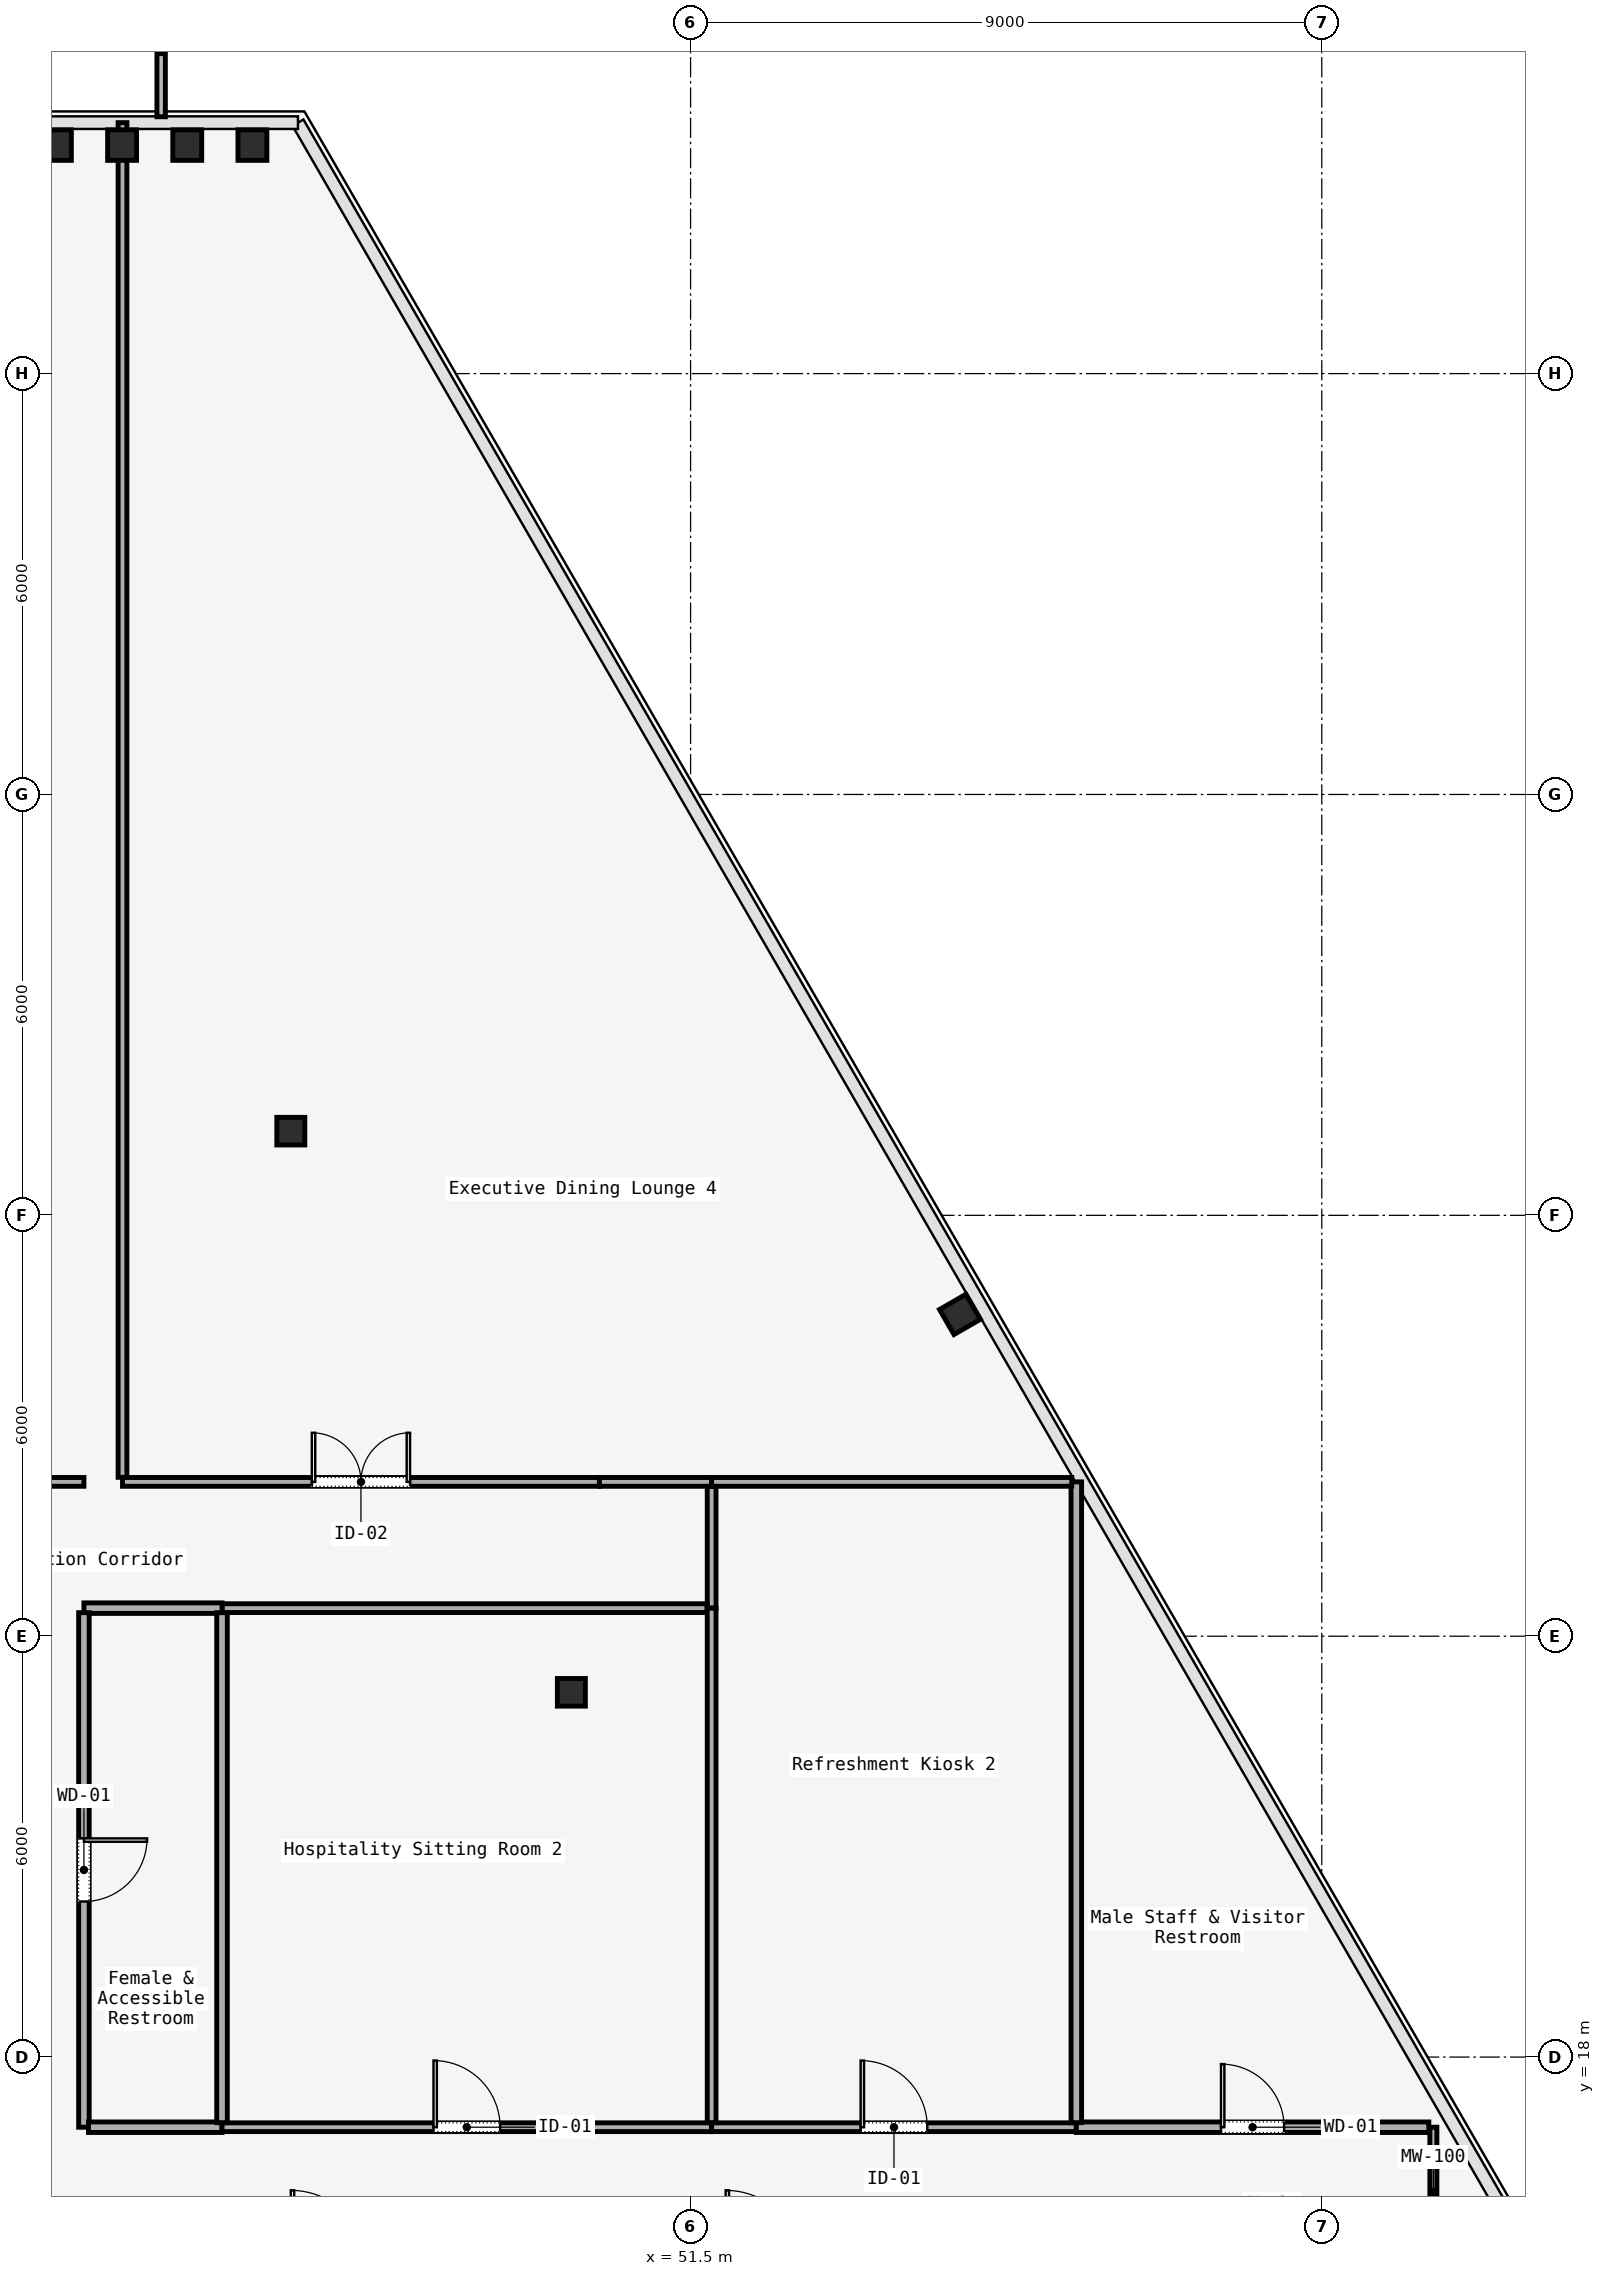
"""IFC4 building model, lengths in metres.
Left out: names, types, materials, properties, quantities, classifications, styles, units other than length and angle.
Written with IfcOpenShell. Run it as: python <this file> out.ifc"""

import sys

from ifc_helpers import new_model, si_unit, direction, frame, frame_2d, origin, origin_2d, place, context, subcontext, project, spatial, rectangle, i_section, extrude, element, fill, save


model = new_model("IFC4")
c1 = context("Model", 3, precision=1e-05, world=origin(), true_north=direction((0.0, 1.0)))
c2 = subcontext(c1, "Body", "Model", "MODEL_VIEW")
j1 = project(units=[si_unit("LENGTHUNIT", "METRE"), si_unit("PLANEANGLEUNIT", "RADIAN")], contexts=[c1])
p1 = place(None, origin())
s1 = spatial("IfcSite", under=j1, at=p1, CompositionType="ELEMENT")
p2 = place(p1, origin())
s2 = spatial("IfcBuilding", under=s1, at=p2, CompositionType="ELEMENT")
p3 = place(p2, frame((0.0, 0.0, 225.6)))
s3 = spatial("IfcBuildingStorey", under=s2, at=p3, CompositionType="ELEMENT", Elevation=225.6)
for number, where, z_axis, x_axis in (
    (1, (49.8, 23.2, 0.0), (0.0, 0.0, 1.0), (1.0, 0.0, 0.0)),
    (2, (45.8, 31.2, 0.0), (0.0, 0.0, 1.0), (1.0, 0.0, 0.0)),
):
    element("IfcColumn", number, at=place(p3, frame(where, z_axis=z_axis, x_axis=x_axis)), inside=s3, PredefinedType="COLUMN", context=c2, shape_type="SweptSolid", body=[
        extrude(i_section(OverallWidth=0.399, OverallDepth=0.394, WebThickness=0.023, FlangeThickness=0.037, FilletRadius=0.015, at=origin_2d()), origin(), (0.0, 0.0, 1.0), 3.58),
    ])
p4 = place(p3, frame((55.341, 28.588, 0.0), z_axis=(-0.064916640707, -0.112454555725, 0.991534065303), x_axis=(-0.003725683455, 0.99365032646, 0.112450646988)))
e3 = element("IfcColumn", 3, at=p4, inside=s3, PredefinedType="COLUMN", context=c2, shape_type="SweptSolid", body=[
    extrude(i_section(OverallWidth=0.412, OverallDepth=0.435, WebThickness=0.036, FlangeThickness=0.044, FilletRadius=0.015, at=origin_2d()), origin(), (0.0, 0.0, 1.0), 3.61),
])
p5 = place(p3, frame((45.252, 45.258, 0.0), z_axis=(-0.073421459849, -0.080200911359, 0.994070974856), x_axis=(0.737593959285, -0.675244512178, 0.0)))
e4 = element("IfcColumn", 4, at=p5, inside=s3, PredefinedType="COLUMN", context=c2, shape_type="SweptSolid", body=[
    extrude(i_section(OverallWidth=0.412, OverallDepth=0.435, WebThickness=0.036, FlangeThickness=0.044, FilletRadius=0.015, at=origin_2d()), origin(), (0.0, 0.0, 1.0), 3.601),
])
p6 = place(p3, frame((44.323, 45.258, 0.0), z_axis=(-0.052474588261, -0.080307164182, 0.995387952995), x_axis=(0.837131636579, -0.54700148358, 0.0)))
e5 = element("IfcColumn", 5, at=p6, inside=s3, PredefinedType="COLUMN", context=c2, shape_type="SweptSolid", body=[
    extrude(i_section(OverallWidth=0.412, OverallDepth=0.435, WebThickness=0.036, FlangeThickness=0.044, FilletRadius=0.015, at=origin_2d()), origin(), (0.0, 0.0, 1.0), 3.596),
])
p7 = place(p3, frame((43.394, 45.258, 0.0), z_axis=(-0.031526107697, -0.080377985787, 0.996265769729), x_axis=(0.930952218827, -0.365141022431, 0.0)))
e6 = element("IfcColumn", 6, at=p7, inside=s3, PredefinedType="COLUMN", context=c2, shape_type="SweptSolid", body=[
    extrude(i_section(OverallWidth=0.412, OverallDepth=0.435, WebThickness=0.036, FlangeThickness=0.044, FilletRadius=0.015, at=origin_2d()), origin(), (0.0, 0.0, 1.0), 3.593),
])
p8 = place(p3, frame((42.465, 45.258, 0.0), z_axis=(-0.010468036489, -0.080413553032, 0.996706617165), x_axis=(0.991633098704, -0.129088332376, 0.0)))
e7 = element("IfcColumn", 7, at=p8, inside=s3, PredefinedType="COLUMN", context=c2, shape_type="SweptSolid", body=[
    extrude(i_section(OverallWidth=0.412, OverallDepth=0.435, WebThickness=0.036, FlangeThickness=0.044, FilletRadius=0.015, at=origin_2d()), origin(), (0.0, 0.0, 1.0), 3.592),
])
p9 = place(p3, frame((62.091, 17.0, 0.0), z_axis=(0.0, 0.0, 1.0), x_axis=(0.0, -1.0, 0.0)))
e8 = element("IfcWall", 8, at=p9, inside=s3, PredefinedType="MOVABLE", context=c2, shape_type="SweptSolid", body=[
    extrude(rectangle(XDim=1.85, YDim=0.1, at=frame_2d((0.925, 0.0))), origin(), (0.0, 0.0, 1.0), 3.01),
])
p10 = place(p3, frame((41.15, 26.2, 0.0), z_axis=(0.0, 0.0, 1.0), x_axis=(1.0, 0.0, 0.0)))
e9 = element("IfcWall", 9, at=p10, inside=s3, PredefinedType="PARTITIONING", context=c2, shape_type="SweptSolid", body=[
    extrude(rectangle(XDim=1.7, YDim=0.125, at=frame_2d((0.85, 0.0))), origin(), (0.0, 0.0, 1.0), 3.01),
])
p11 = place(p3, frame((43.4, 26.2, 0.0), z_axis=(0.0, 0.0, 1.0), x_axis=(1.0, 0.0, 0.0)))
e10 = element("IfcWall", 10, at=p11, inside=s3, PredefinedType="PARTITIONING", context=c2, shape_type="SweptSolid", body=[
    extrude(rectangle(XDim=6.8, YDim=0.125, at=frame_2d((3.4, 0.0))), origin(), (0.0, 0.0, 1.0), 3.01),
])
p12 = place(p11, frame((2.7, 0.0, 0.0)))
e11 = element("IfcOpeningElement", 11, at=p12, cuts=e10, PredefinedType="OPENING", context=c2, shape_type="SweptSolid", body=[
    extrude(rectangle(XDim=1.4, YDim=2.2, at=frame_2d((0.7, 1.1))), frame((0.0, 0.062, 0.0), z_axis=(0.0, -1.0, 0.0), x_axis=(1.0, 0.0, 0.0)), (0.0, 0.0, 1.0), 0.125),
])
p13 = place(p3, frame((50.2, 26.2, 0.0), z_axis=(0.0, 0.0, 1.0), x_axis=(1.0, 0.0, 0.0)))
e12 = element("IfcWall", 12, at=p13, inside=s3, PredefinedType="PARTITIONING", context=c2, shape_type="SweptSolid", body=[
    extrude(rectangle(XDim=1.6, YDim=0.125, at=frame_2d((0.8, 0.0))), origin(), (0.0, 0.0, 1.0), 3.01),
])
p14 = place(p3, frame((51.8, 26.135, 0.0), z_axis=(0.0, 0.0, 1.0), x_axis=(0.0, -1.0, 0.0)))
e13 = element("IfcWall", 13, at=p14, inside=s3, PredefinedType="PARTITIONING", context=c2, shape_type="SweptSolid", body=[
    extrude(rectangle(XDim=1.735, YDim=0.125, at=frame_2d((0.868, 0.0))), origin(), (0.0, 0.0, 1.0), 3.01),
])
p15 = place(p3, frame((51.735, 24.4, 0.0), z_axis=(0.0, 0.0, 1.0), x_axis=(-1.0, 0.0, 0.0)))
e14 = element("IfcWall", 14, at=p15, inside=s3, PredefinedType="PARTITIONING", context=c2, shape_type="SweptSolid", body=[
    extrude(rectangle(XDim=6.916, YDim=0.125, at=frame_2d((3.458, 0.0))), origin(), (0.0, 0.0, 1.0), 3.01),
])
p16 = place(p3, frame((44.819, 24.4, 0.0), z_axis=(0.0, 0.0, 1.0), x_axis=(-1.0, 0.0, 0.0)))
e15 = element("IfcWall", 15, at=p16, inside=s3, PredefinedType="PARTITIONING", context=c2, shape_type="SweptSolid", body=[
    extrude(rectangle(XDim=1.969, YDim=0.15, at=frame_2d((0.984, 0.0))), origin(), (0.0, 0.0, 1.0), 3.01),
])
p17 = place(p3, frame((42.85, 24.335, 0.0), z_axis=(0.0, 0.0, 1.0), x_axis=(0.0, -1.0, 0.0)))
e16 = element("IfcWall", 16, at=p17, inside=s3, PredefinedType="PARTITIONING", context=c2, shape_type="SweptSolid", body=[
    extrude(rectangle(XDim=7.335, YDim=0.15, at=frame_2d((3.667, 0.0))), origin(), (0.0, 0.0, 1.0), 3.01),
])
p18 = place(p17, frame((3.218, 0.0, 0.0)))
e17 = element("IfcOpeningElement", 17, at=p18, cuts=e16, PredefinedType="OPENING", context=c2, shape_type="SweptSolid", body=[
    extrude(rectangle(XDim=0.9, YDim=2.15, at=frame_2d((0.45, 1.075))), frame((0.0, 0.075, 0.0), z_axis=(0.0, -1.0, 0.0), x_axis=(1.0, 0.0, 0.0)), (0.0, 0.0, 1.0), 0.15),
])
p19 = place(p3, frame((42.915, 17.0, 0.0), z_axis=(0.0, 0.0, 1.0), x_axis=(1.0, 0.0, 0.0)))
e18 = element("IfcWall", 18, at=p19, inside=s3, PredefinedType="PARTITIONING", context=c2, shape_type="SweptSolid", body=[
    extrude(rectangle(XDim=1.904, YDim=0.15, at=frame_2d((0.952, 0.0))), origin(), (0.0, 0.0, 1.0), 3.01),
])
p20 = place(p3, frame((44.819, 17.0, 0.0), z_axis=(0.0, 0.0, 1.0), x_axis=(1.0, 0.0, 0.0)))
e19 = element("IfcWall", 19, at=p20, inside=s3, PredefinedType="PARTITIONING", context=c2, shape_type="SweptSolid", body=[
    extrude(rectangle(XDim=6.981, YDim=0.125, at=frame_2d((3.49, 0.0))), origin(), (0.0, 0.0, 1.0), 3.01),
])
p21 = place(p20, frame((3.015, 0.0, 0.0)))
e20 = element("IfcOpeningElement", 20, at=p21, cuts=e19, PredefinedType="OPENING", context=c2, shape_type="SweptSolid", body=[
    extrude(rectangle(XDim=0.95, YDim=2.2, at=frame_2d((0.475, 1.1))), frame((0.0, 0.062, 0.0), z_axis=(0.0, -1.0, 0.0), x_axis=(1.0, 0.0, 0.0)), (0.0, 0.0, 1.0), 0.125),
])
p22 = place(p3, frame((51.8, 17.0, 0.0), z_axis=(0.0, 0.0, 1.0), x_axis=(1.0, 0.0, 0.0)))
e21 = element("IfcWall", 21, at=p22, inside=s3, PredefinedType="PARTITIONING", context=c2, shape_type="SweptSolid", body=[
    extrude(rectangle(XDim=5.2, YDim=0.125, at=frame_2d((2.6, 0.0))), origin(), (0.0, 0.0, 1.0), 3.01),
])
p23 = place(p22, frame((2.125, 0.0, 0.0)))
e22 = element("IfcOpeningElement", 22, at=p23, cuts=e21, PredefinedType="OPENING", context=c2, shape_type="SweptSolid", body=[
    extrude(rectangle(XDim=0.95, YDim=2.2, at=frame_2d((0.475, 1.1))), frame((0.0, 0.062, 0.0), z_axis=(0.0, -1.0, 0.0), x_axis=(1.0, 0.0, 0.0)), (0.0, 0.0, 1.0), 0.125),
])
p24 = place(p3, frame((57.0, 17.0, 0.0), z_axis=(0.0, 0.0, 1.0), x_axis=(1.0, 0.0, 0.0)))
e23 = element("IfcWall", 23, at=p24, inside=s3, PredefinedType="PARTITIONING", context=c2, shape_type="SweptSolid", body=[
    extrude(rectangle(XDim=5.026, YDim=0.15, at=frame_2d((2.513, 0.0))), origin(), (0.0, 0.0, 1.0), 3.01),
])
p25 = place(p24, frame((2.063, 0.0, 0.0)))
e24 = element("IfcOpeningElement", 24, at=p25, cuts=e23, PredefinedType="OPENING", context=c2, shape_type="SweptSolid", body=[
    extrude(rectangle(XDim=0.9, YDim=2.15, at=frame_2d((0.45, 1.075))), frame((0.0, 0.075, 0.0), z_axis=(0.0, -1.0, 0.0), x_axis=(1.0, 0.0, 0.0)), (0.0, 0.0, 1.0), 0.15),
])
p26 = place(p3, frame((57.0, 17.065, 0.0), z_axis=(0.0, 0.0, 1.0), x_axis=(0.0, 1.0, 0.0)))
e25 = element("IfcWall", 25, at=p26, inside=s3, PredefinedType="PARTITIONING", context=c2, shape_type="SweptSolid", body=[
    extrude(rectangle(XDim=9.135, YDim=0.15, at=frame_2d((4.567, 0.0))), origin(), (0.0, 0.0, 1.0), 3.01),
])
p27 = place(p3, frame((44.819, 24.335, 0.0), z_axis=(0.0, 0.0, 1.0), x_axis=(0.0, -1.0, 0.0)))
e26 = element("IfcWall", 26, at=p27, inside=s3, PredefinedType="PARTITIONING", context=c2, shape_type="SweptSolid", body=[
    extrude(rectangle(XDim=7.27, YDim=0.15, at=frame_2d((3.635, 0.0))), origin(), (0.0, 0.0, 1.0), 3.01),
])
p28 = place(p3, frame((51.8, 24.4, 0.0), z_axis=(0.0, 0.0, 1.0), x_axis=(0.0, -1.0, 0.0)))
e27 = element("IfcWall", 27, at=p28, inside=s3, PredefinedType="PARTITIONING", context=c2, shape_type="SweptSolid", body=[
    extrude(rectangle(XDim=7.335, YDim=0.125, at=frame_2d((3.667, 0.0))), origin(), (0.0, 0.0, 1.0), 3.01),
])
p29 = place(p3, frame((51.8, 26.2, 0.0), z_axis=(0.0, 0.0, 1.0), x_axis=(1.0, 0.0, 0.0)))
e28 = element("IfcWall", 28, at=p29, inside=s3, PredefinedType="PARTITIONING", context=c2, shape_type="SweptSolid", body=[
    extrude(rectangle(XDim=5.135, YDim=0.125, at=frame_2d((2.567, 0.0))), origin(), (0.0, 0.0, 1.0), 3.01),
])
p30 = place(p3, frame((43.4, 26.265, 0.0), z_axis=(0.0, 0.0, 1.0), x_axis=(0.0, 1.0, 0.0)))
e29 = element("IfcWall", 29, at=p30, inside=s3, PredefinedType="PARTITIONING", context=c2, shape_type="SweptSolid", body=[
    extrude(rectangle(XDim=19.313, YDim=0.125, at=frame_2d((9.656, 0.0))), origin(), (0.0, 0.0, 1.0), 3.01),
])
p31 = place(p25, origin())
e30 = element("IfcDoor", 30, at=p31, inside=s3, OperationType="SINGLE_SWING_LEFT", PredefinedType="DOOR", context=c2, shape_type="SweptSolid", body=[
    extrude(rectangle(XDim=0.9, YDim=2.15, at=frame_2d((0.45, 1.075))), frame((0.0, 0.025, 0.0), z_axis=(0.0, -1.0, 0.0), x_axis=(1.0, 0.0, 0.0)), (0.0, 0.0, 1.0), 0.05),
])
fill(e24, e30)
p32 = place(p18, origin())
e31 = element("IfcDoor", 31, at=p32, inside=s3, OperationType="SINGLE_SWING_RIGHT", PredefinedType="DOOR", context=c2, shape_type="SweptSolid", body=[
    extrude(rectangle(XDim=0.9, YDim=2.15, at=frame_2d((0.45, 1.075))), frame((0.0, 0.025, 0.0), z_axis=(0.0, -1.0, 0.0), x_axis=(1.0, 0.0, 0.0)), (0.0, 0.0, 1.0), 0.05),
])
fill(e17, e31)
p33 = place(p21, origin())
e32 = element("IfcDoor", 32, at=p33, inside=s3, OperationType="SINGLE_SWING_LEFT", PredefinedType="DOOR", context=c2, shape_type="SweptSolid", body=[
    extrude(rectangle(XDim=0.95, YDim=2.2, at=frame_2d((0.475, 1.1))), frame((0.0, 0.025, 0.0), z_axis=(0.0, -1.0, 0.0), x_axis=(1.0, 0.0, 0.0)), (0.0, 0.0, 1.0), 0.05),
])
fill(e20, e32)
p34 = place(p23, origin())
e33 = element("IfcDoor", 33, at=p34, inside=s3, OperationType="SINGLE_SWING_LEFT", PredefinedType="DOOR", context=c2, shape_type="SweptSolid", body=[
    extrude(rectangle(XDim=0.95, YDim=2.2, at=frame_2d((0.475, 1.1))), frame((0.0, 0.025, 0.0), z_axis=(0.0, -1.0, 0.0), x_axis=(1.0, 0.0, 0.0)), (0.0, 0.0, 1.0), 0.05),
])
fill(e22, e33)
p35 = place(p12, origin())
e34 = element("IfcDoor", 34, at=p35, inside=s3, OperationType="SINGLE_SWING_LEFT", PredefinedType="DOOR", context=c2, shape_type="SweptSolid", body=[
    extrude(rectangle(XDim=1.4, YDim=2.2, at=frame_2d((0.7, 1.1))), frame((0.0, 0.025, 0.0), z_axis=(0.0, -1.0, 0.0), x_axis=(1.0, 0.0, 0.0)), (0.0, 0.0, 1.0), 0.05),
])
fill(e11, e34)
save(model, sys.argv[1])
